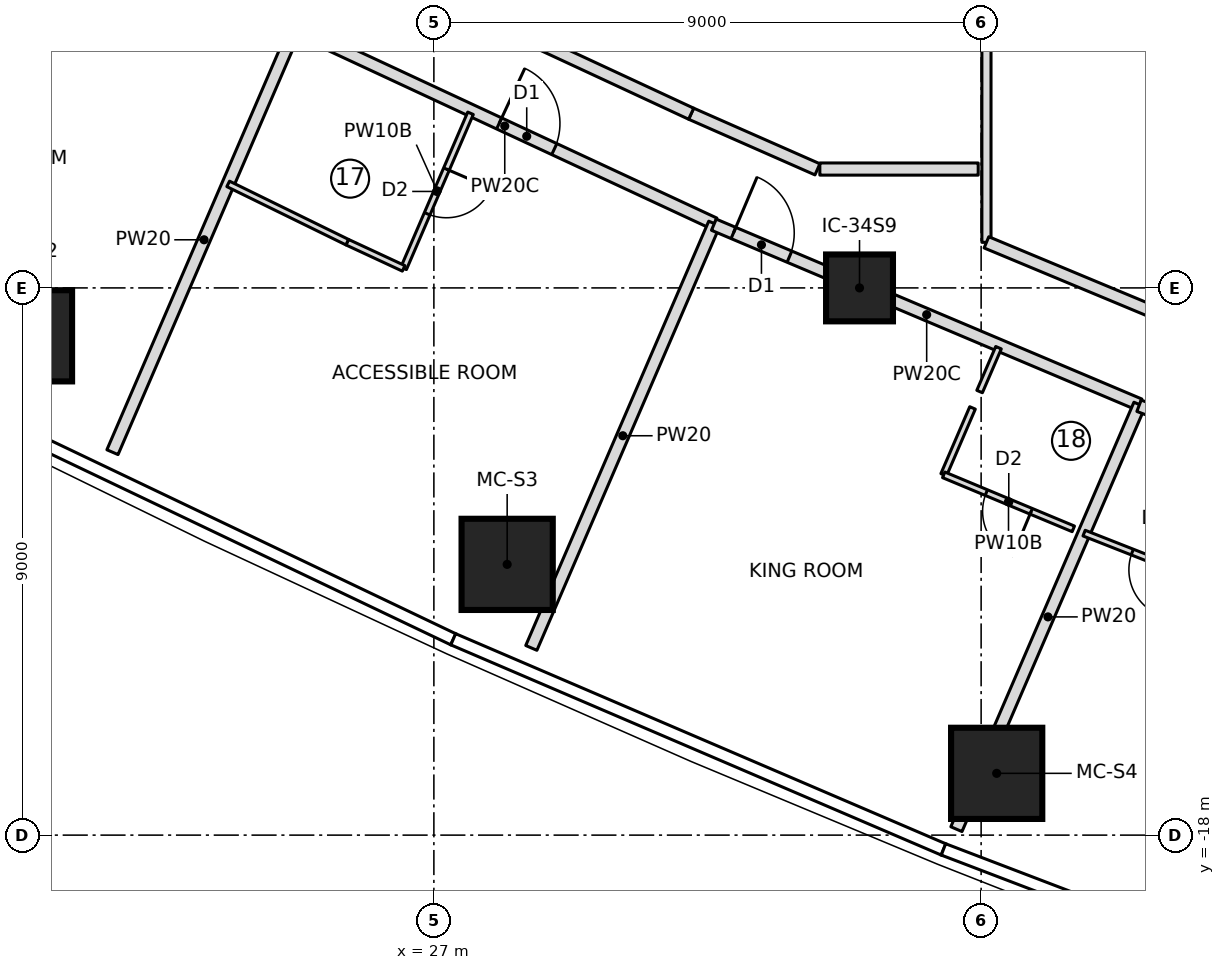
"""IFC4 building model, lengths in metres.
Left out: names, types, materials, properties, quantities, classifications, styles, units other than length and angle.
Written with IfcOpenShell. Run it as: python <this file> out.ifc"""

import sys

from ifc_helpers import new_model, si_unit, direction, frame, frame_2d, origin, origin_2d, place, context, subcontext, project, spatial, rectangle, extrude, element, fill, save


model = new_model("IFC4")
c1 = context("Model", 3, precision=1e-05, world=origin(), true_north=direction((0.0, 1.0)))
c2 = subcontext(c1, "Body", "Model", "MODEL_VIEW")
j1 = project(units=[si_unit("LENGTHUNIT", "METRE"), si_unit("PLANEANGLEUNIT", "RADIAN")], contexts=[c1])
p1 = place(None, origin())
s1 = spatial("IfcSite", under=j1, at=p1, CompositionType="ELEMENT")
p2 = place(p1, origin())
s2 = spatial("IfcBuilding", under=s1, at=p2, CompositionType="ELEMENT")
p3 = place(p2, frame((0.0, 0.0, 162.15)))
s3 = spatial("IfcBuildingStorey", under=s2, at=p3, CompositionType="ELEMENT", Elevation=162.15)
for number, where, z_axis, x_axis in (
    (1, (20.3, -9.788, 0.0), (0.0, 0.0, 1.0), (1.0, 0.0, 0.0)),
    (2, (28.205, -13.547, 0.0), (0.0, 0.0, 1.0), (1.0, 0.0, 0.0)),
    (3, (36.256, -16.984, 0.0), (0.0, 0.0, 1.0), (1.0, 0.0, 0.0)),
):
    element("IfcColumn", number, at=place(p3, frame(where, z_axis=z_axis, x_axis=x_axis)), inside=s3, PredefinedType="COLUMN", context=c2, shape_type="SweptSolid", body=[
        extrude(rectangle(XDim=1.5, YDim=1.5, at=origin_2d()), origin(), (0.0, 0.0, 1.0), 3.55),
    ])
p4 = place(p3, frame((34.0, -9.0, 0.0), z_axis=(0.0, 0.0, 1.0), x_axis=(1.0, 0.0, 0.0)))
e4 = element("IfcColumn", 4, at=p4, inside=s3, PredefinedType="COLUMN", context=c2, shape_type="SweptSolid", body=[
    extrude(rectangle(XDim=1.1, YDim=1.1, at=origin_2d()), origin(), (0.0, 0.0, 1.0), 3.55),
])
p5 = place(p3, frame((21.714, -11.702, 0.0), z_axis=(0.0, 0.0, 1.0), x_axis=(0.395982367396, 0.918258114427, 0.0)))
e5 = element("IfcWall", 5, at=p5, inside=s3, PredefinedType="PARTITIONING", context=c2, shape_type="SweptSolid", body=[
    extrude(rectangle(XDim=7.609, YDim=0.2, at=frame_2d((3.804, 0.0))), origin(), (0.0, 0.0, 1.0), 3.15),
])
p6 = place(p3, frame((24.719, -4.733, 0.0), z_axis=(0.0, 0.0, 1.0), x_axis=(0.906593711122, -0.422004553238, 0.0)))
e6 = element("IfcWall", 6, at=p6, inside=s3, PredefinedType="PARTITIONING", context=c2, shape_type="SweptSolid", body=[
    extrude(rectangle(XDim=7.603, YDim=0.2, at=frame_2d((3.802, 0.0))), origin(), (0.0, 0.0, 1.0), 3.15),
])
p7 = place(p6, frame((3.7, 0.0, 0.0)))
e7 = element("IfcOpeningElement", 7, at=p7, cuts=e6, PredefinedType="OPENING", context=c2, shape_type="SweptSolid", body=[
    extrude(rectangle(XDim=1.0, YDim=2.1, at=frame_2d((0.5, 1.05))), frame((0.0, 0.11, 0.0), z_axis=(0.0, -1.0, 0.0), x_axis=(1.0, 0.0, 0.0)), (0.0, 0.0, 1.0), 0.22),
])
p8 = place(p3, frame((27.603, -6.128, 0.0), z_axis=(0.0, 0.0, 1.0), x_axis=(-0.396018464604, -0.918242547311, 0.0)))
e8 = element("IfcWall", 8, at=p8, inside=s3, PredefinedType="PARTITIONING", context=c2, shape_type="SweptSolid", body=[
    extrude(rectangle(XDim=2.778, YDim=0.1, at=frame_2d((1.389, 0.0))), origin(), (0.0, 0.0, 1.0), 3.15),
])
p9 = place(p8, frame((1.0, 0.0, 0.0)))
e9 = element("IfcOpeningElement", 9, at=p9, cuts=e8, PredefinedType="OPENING", context=c2, shape_type="SweptSolid", body=[
    extrude(rectangle(XDim=0.8, YDim=2.1, at=frame_2d((0.4, 1.05))), frame((0.0, 0.06, 0.0), z_axis=(0.0, -1.0, 0.0), x_axis=(1.0, 0.0, 0.0)), (0.0, 0.0, 1.0), 0.12),
])
p10 = place(p3, frame((26.503, -8.679, 0.0), z_axis=(0.0, 0.0, 1.0), x_axis=(-0.906901476145, 0.421342749512, 0.0)))
e10 = element("IfcWall", 10, at=p10, inside=s3, PredefinedType="PARTITIONING", context=c2, shape_type="SweptSolid", body=[
    extrude(rectangle(XDim=1.023, YDim=0.1, at=frame_2d((0.511, 0.0))), origin(), (0.0, 0.0, 1.0), 3.15),
])
p11 = place(p3, frame((25.575, -8.248, 0.0), z_axis=(0.0, 0.0, 1.0), x_axis=(-0.898158387811, 0.439672048696, 0.0)))
e11 = element("IfcWall", 11, at=p11, inside=s3, PredefinedType="PARTITIONING", context=c2, shape_type="SweptSolid", body=[
    extrude(rectangle(XDim=2.18, YDim=0.1, at=frame_2d((1.09, 0.0))), origin(), (0.0, 0.0, 1.0), 3.15),
])
p12 = place(p3, frame((28.603, -14.921, 0.0), z_axis=(0.0, 0.0, 1.0), x_axis=(0.395976934703, 0.91826045716, 0.0)))
e12 = element("IfcWall", 12, at=p12, inside=s3, PredefinedType="PARTITIONING", context=c2, shape_type="SweptSolid", body=[
    extrude(rectangle(XDim=7.6, YDim=0.2, at=frame_2d((3.8, 0.0))), origin(), (0.0, 0.0, 1.0), 3.15),
])
p13 = place(p3, frame((31.604, -7.96, 0.0), z_axis=(0.0, 0.0, 1.0), x_axis=(0.921069634751, -0.389397904386, 0.0)))
e13 = element("IfcWall", 13, at=p13, inside=s3, PredefinedType="PARTITIONING", context=c2, shape_type="SweptSolid", body=[
    extrude(rectangle(XDim=7.6, YDim=0.2, at=frame_2d((3.8, 0.0))), origin(), (0.0, 0.0, 1.0), 3.15),
])
p14 = place(p13, frame((0.35, 0.0, 0.0)))
e14 = element("IfcOpeningElement", 14, at=p14, cuts=e13, PredefinedType="OPENING", context=c2, shape_type="SweptSolid", body=[
    extrude(rectangle(XDim=1.0, YDim=2.1, at=frame_2d((0.5, 1.05))), frame((0.0, 0.11, 0.0), z_axis=(0.0, -1.0, 0.0), x_axis=(1.0, 0.0, 0.0)), (0.0, 0.0, 1.0), 0.22),
])
p15 = place(p3, frame((35.384, -12.074, 0.0), z_axis=(0.0, 0.0, 1.0), x_axis=(0.396057430794, 0.918225741043, 0.0)))
e15 = element("IfcWall", 15, at=p15, inside=s3, PredefinedType="PARTITIONING", context=c2, shape_type="SweptSolid", body=[
    extrude(rectangle(XDim=1.198, YDim=0.1, at=frame_2d((0.599, 0.0))), origin(), (0.0, 0.0, 1.0), 3.15),
])
p16 = place(p3, frame((35.975, -10.705, 0.0), z_axis=(0.0, 0.0, 1.0), x_axis=(0.396019167007, 0.918242244379, 0.0)))
e16 = element("IfcWall", 16, at=p16, inside=s3, PredefinedType="PARTITIONING", context=c2, shape_type="SweptSolid", body=[
    extrude(rectangle(XDim=0.785, YDim=0.1, at=frame_2d((0.393, 0.0))), origin(), (0.0, 0.0, 1.0), 3.15),
])
p17 = place(p3, frame((37.516, -12.963, 0.0), z_axis=(0.0, 0.0, 1.0), x_axis=(-0.923014363649, 0.384765492863, 0.0)))
e17 = element("IfcWall", 17, at=p17, inside=s3, PredefinedType="PARTITIONING", context=c2, shape_type="SweptSolid", body=[
    extrude(rectangle(XDim=2.31, YDim=0.1, at=frame_2d((1.155, 0.0))), origin(), (0.0, 0.0, 1.0), 3.15),
])
p18 = place(p17, frame((0.75, 0.0, 0.0)))
e18 = element("IfcOpeningElement", 18, at=p18, cuts=e17, PredefinedType="OPENING", context=c2, shape_type="SweptSolid", body=[
    extrude(rectangle(XDim=0.8, YDim=2.1, at=frame_2d((0.4, 1.05))), frame((0.0, 0.06, 0.0), z_axis=(0.0, -1.0, 0.0), x_axis=(1.0, 0.0, 0.0)), (0.0, 0.0, 1.0), 0.12),
])
p19 = place(p3, frame((35.594, -17.902, 0.0), z_axis=(0.0, 0.0, 1.0), x_axis=(0.395975928923, 0.918260890877, 0.0)))
e19 = element("IfcWall", 19, at=p19, inside=s3, PredefinedType="PARTITIONING", context=c2, shape_type="SweptSolid", body=[
    extrude(rectangle(XDim=7.604, YDim=0.2, at=frame_2d((3.802, 0.0))), origin(), (0.0, 0.0, 1.0), 3.15),
])
p20 = place(p3, frame((38.597, -10.938, 0.0), z_axis=(0.0, 0.0, 1.0), x_axis=(0.934963762263, -0.354743235672, 0.0)))
e20 = element("IfcWall", 20, at=p20, inside=s3, PredefinedType="PARTITIONING", context=c2, shape_type="SweptSolid", body=[
    extrude(rectangle(XDim=7.608, YDim=0.2, at=frame_2d((3.804, 0.0))), origin(), (0.0, 0.0, 1.0), 3.15),
])
p21 = place(p20, frame((3.05, 0.0, 0.0)))
e21 = element("IfcOpeningElement", 21, at=p21, cuts=e20, PredefinedType="OPENING", context=c2, shape_type="SweptSolid", body=[
    extrude(rectangle(XDim=1.0, YDim=2.1, at=frame_2d((0.5, 1.05))), frame((0.0, 0.11, 0.0), z_axis=(0.0, -1.0, 0.0), x_axis=(1.0, 0.0, 0.0)), (0.0, 0.0, 1.0), 0.22),
])
p22 = place(p3, frame((40.021, -13.948, 0.0), z_axis=(0.0, 0.0, 1.0), x_axis=(-0.930568677441, 0.366117380856, 0.0)))
e22 = element("IfcWall", 22, at=p22, inside=s3, PredefinedType="PARTITIONING", context=c2, shape_type="SweptSolid", body=[
    extrude(rectangle(XDim=2.501, YDim=0.1, at=frame_2d((1.25, 0.0))), origin(), (0.0, 0.0, 1.0), 3.15),
])
p23 = place(p22, frame((0.85, 0.0, 0.0)))
e23 = element("IfcOpeningElement", 23, at=p23, cuts=e22, PredefinedType="OPENING", context=c2, shape_type="SweptSolid", body=[
    extrude(rectangle(XDim=0.8, YDim=2.1, at=frame_2d((0.4, 1.05))), frame((0.0, 0.06, 0.0), z_axis=(0.0, -1.0, 0.0), x_axis=(1.0, 0.0, 0.0)), (0.0, 0.0, 1.0), 0.12),
])
p24 = place(p3, frame((33.308, -7.05, 0.0), z_axis=(0.0, 0.0, 1.0), x_axis=(-0.915102334452, 0.403221672881, 0.0)))
e24 = element("IfcWall", 24, at=p24, inside=s3, PredefinedType="PARTITIONING", context=c2, shape_type="SweptSolid", body=[
    extrude(rectangle(XDim=2.269, YDim=0.2, at=frame_2d((1.135, 0.0))), origin(), (0.0, 0.0, 1.0), 3.15),
])
p25 = place(p3, frame((31.231, -6.135, 0.0), z_axis=(0.0, 0.0, 1.0), x_axis=(-0.906830275285, 0.421495968933, 0.0)))
e25 = element("IfcWall", 25, at=p25, inside=s3, PredefinedType="PARTITIONING", context=c2, shape_type="SweptSolid", body=[
    extrude(rectangle(XDim=4.195, YDim=0.2, at=frame_2d((2.098, 0.0))), origin(), (0.0, 0.0, 1.0), 3.15),
])
p26 = place(p3, frame((36.087, -8.25, 0.0), z_axis=(0.0, 0.0, 1.0), x_axis=(0.0, 1.0, 0.0)))
e26 = element("IfcWall", 26, at=p26, inside=s3, PredefinedType="PARTITIONING", context=c2, shape_type="SweptSolid", body=[
    extrude(rectangle(XDim=16.501, YDim=0.15, at=frame_2d((8.25, 0.0))), origin(), (0.0, 0.0, 1.0), 3.15),
])
p27 = place(p3, frame((38.943, -9.441, 0.0), z_axis=(0.0, 0.0, 1.0), x_axis=(-0.923013875818, 0.384766663118, 0.0)))
e27 = element("IfcWall", 27, at=p27, inside=s3, PredefinedType="PARTITIONING", context=c2, shape_type="SweptSolid", body=[
    extrude(rectangle(XDim=3.094, YDim=0.2, at=frame_2d((1.547, 0.0))), origin(), (0.0, 0.0, 1.0), 3.15),
])
p28 = place(p3, frame((35.952, -7.045, 0.0), z_axis=(0.0, 0.0, 1.0), x_axis=(-0.999999982426, 0.000187476562, 0.0)))
e28 = element("IfcWall", 28, at=p28, inside=s3, PredefinedType="PARTITIONING", context=c2, shape_type="SweptSolid", body=[
    extrude(rectangle(XDim=2.604, YDim=0.2, at=frame_2d((1.302, 0.0))), origin(), (0.0, 0.0, 1.0), 3.15),
])
p29 = place(p9, origin())
e29 = element("IfcDoor", 29, at=p29, inside=s3, OperationType="SINGLE_SWING_LEFT", PredefinedType="DOOR", context=c2, shape_type="SweptSolid", body=[
    extrude(rectangle(XDim=0.8, YDim=2.1, at=frame_2d((0.4, 1.05))), frame((0.0, 0.025, 0.0), z_axis=(0.0, -1.0, 0.0), x_axis=(1.0, 0.0, 0.0)), (0.0, 0.0, 1.0), 0.05),
])
fill(e9, e29)
p30 = place(p7, origin())
e30 = element("IfcDoor", 30, at=p30, inside=s3, OperationType="SINGLE_SWING_LEFT", PredefinedType="DOOR", context=c2, shape_type="SweptSolid", body=[
    extrude(rectangle(XDim=1.0, YDim=2.1, at=frame_2d((0.5, 1.05))), frame((0.0, 0.025, 0.0), z_axis=(0.0, -1.0, 0.0), x_axis=(1.0, 0.0, 0.0)), (0.0, 0.0, 1.0), 0.05),
])
fill(e7, e30)
p31 = place(p18, origin())
e31 = element("IfcDoor", 31, at=p31, inside=s3, OperationType="SINGLE_SWING_LEFT", PredefinedType="DOOR", context=c2, shape_type="SweptSolid", body=[
    extrude(rectangle(XDim=0.8, YDim=2.1, at=frame_2d((0.4, 1.05))), frame((0.0, 0.025, 0.0), z_axis=(0.0, -1.0, 0.0), x_axis=(1.0, 0.0, 0.0)), (0.0, 0.0, 1.0), 0.05),
])
fill(e18, e31)
p32 = place(p14, origin())
e32 = element("IfcDoor", 32, at=p32, inside=s3, OperationType="SINGLE_SWING_LEFT", PredefinedType="DOOR", context=c2, shape_type="SweptSolid", body=[
    extrude(rectangle(XDim=1.0, YDim=2.1, at=frame_2d((0.5, 1.05))), frame((0.0, 0.025, 0.0), z_axis=(0.0, -1.0, 0.0), x_axis=(1.0, 0.0, 0.0)), (0.0, 0.0, 1.0), 0.05),
])
fill(e14, e32)
p33 = place(p23, origin())
e33 = element("IfcDoor", 33, at=p33, inside=s3, OperationType="SINGLE_SWING_LEFT", PredefinedType="DOOR", context=c2, shape_type="SweptSolid", body=[
    extrude(rectangle(XDim=0.8, YDim=2.1, at=frame_2d((0.4, 1.05))), frame((0.0, 0.025, 0.0), z_axis=(0.0, -1.0, 0.0), x_axis=(1.0, 0.0, 0.0)), (0.0, 0.0, 1.0), 0.05),
])
fill(e23, e33)
save(model, sys.argv[1])
